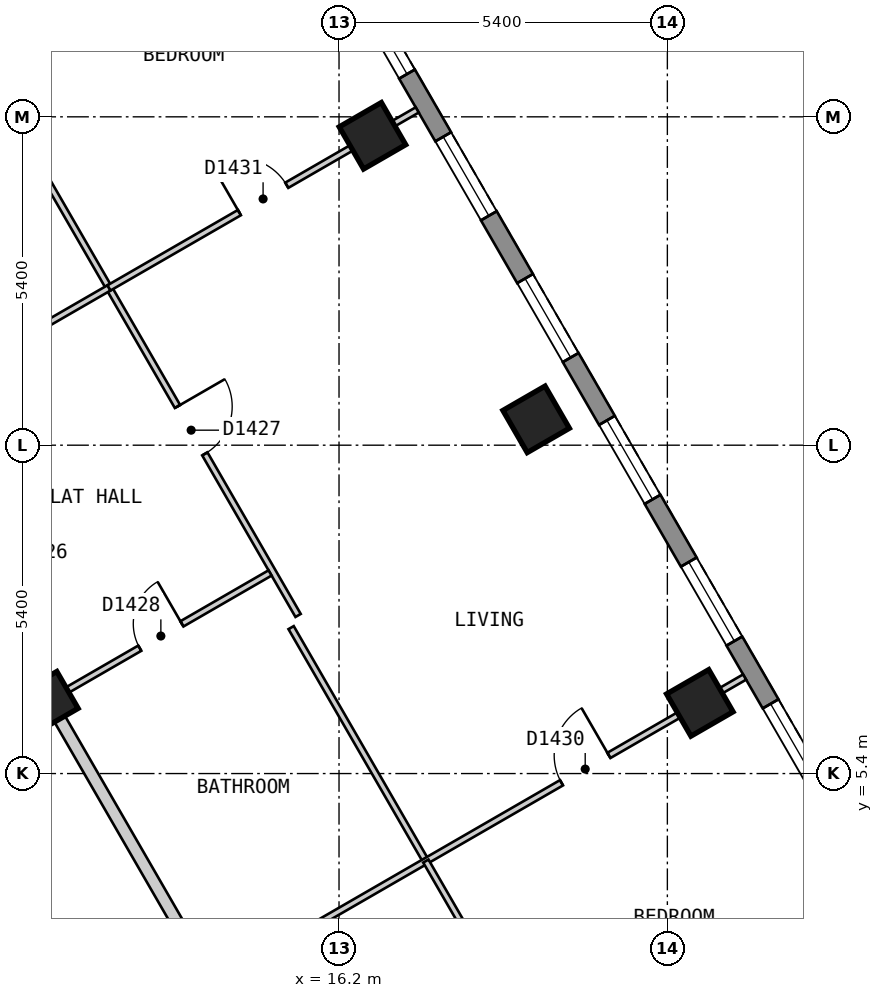
"""IFC4 building model, lengths in metres.
Left out: names, types, materials, properties, quantities, classifications, styles, units other than length and angle.
Written with IfcOpenShell. Run it as: python <this file> out.ifc"""

import sys

from ifc_helpers import new_model, si_unit, direction, frame, frame_2d, origin, origin_2d, place, context, subcontext, project, spatial, polyline, rectangle, outline, extrude, element, fill, save


model = new_model("IFC4")
c1 = context("Model", 3, precision=1e-05, world=origin(), true_north=direction((0.0, 1.0)))
c2 = subcontext(c1, "Body", "Model", "MODEL_VIEW")
j1 = project(units=[si_unit("LENGTHUNIT", "METRE"), si_unit("PLANEANGLEUNIT", "RADIAN")], contexts=[c1])
p1 = place(None, origin())
s1 = spatial("IfcSite", under=j1, at=p1, CompositionType="ELEMENT")
p2 = place(p1, origin())
s2 = spatial("IfcBuilding", under=s1, at=p2, CompositionType="ELEMENT")
p3 = place(p2, frame((0.0, 0.0, 178.2)))
s3 = spatial("IfcBuildingStorey", under=s2, at=p3, CompositionType="ELEMENT", Elevation=178.2)
for number, where, z_axis, x_axis in (
    (1, (22.134, 6.562, 0.0), (0.0, 0.0, 1.0), (-0.5, 0.866, 0.0)),
    (2, (19.442, 11.225, 0.0), (0.0, 0.0, 1.0), (-0.5, 0.866, 0.0)),
    (3, (16.75, 15.888, 0.0), (0.0, 0.0, 1.0), (-0.5, 0.866, 0.0)),
):
    element("IfcColumn", number, at=place(p3, frame(where, z_axis=z_axis, x_axis=x_axis)), inside=s3, PredefinedType="COLUMN", context=c2, shape_type="SweptSolid", body=[
        extrude(rectangle(XDim=0.8, YDim=0.8, at=origin_2d()), origin(), (0.0, 0.0, 1.0), 3.0),
    ])
p4 = place(p3, frame((11.431, 6.6, 0.0), z_axis=(0.0, 0.0, 1.0), x_axis=(-0.5, 0.866025403784, 0.0)))
e4 = element("IfcColumn", 4, at=p4, inside=s3, PredefinedType="COLUMN", context=c2, shape_type="SweptSolid", body=[
    extrude(rectangle(XDim=0.7, YDim=0.7, at=origin_2d()), origin(), (0.0, 0.0, 1.0), 3.0),
])
p5 = place(p3, frame((26.024, 1.825, 0.0), z_axis=(0.0, 0.0, 1.0), x_axis=(-0.500010537973, 0.866019319597, 0.0)))
e5 = element("IfcWall", 5, at=p5, inside=s3, PredefinedType="SOLIDWALL", context=c2, shape_type="SweptSolid", body=[
    extrude(outline(polyline([(0.0, -0.15), (22.863, -0.15), (22.783, 0.15), (0.08, 0.15), (0.0, -0.15)])), origin(), (0.0, 0.0, 1.0), 2.7),
])
p6 = place(p5, frame((1.259, 0.0, 0.15)))
e6 = element("IfcOpeningElement", 6, at=p6, cuts=e5, PredefinedType="OPENING", context=c2, shape_type="SweptSolid", body=[
    extrude(rectangle(XDim=1.5, YDim=2.1, at=frame_2d((0.75, 1.05))), frame((0.0, 0.16, 0.0), z_axis=(0.0, -1.0, 0.0), x_axis=(1.0, 0.0, 0.0)), (0.0, 0.0, 1.0), 0.32),
])
p7 = place(p5, frame((3.952, 0.0, 0.15)))
e7 = element("IfcOpeningElement", 7, at=p7, cuts=e5, PredefinedType="OPENING", context=c2, shape_type="SweptSolid", body=[
    extrude(rectangle(XDim=1.5, YDim=2.1, at=frame_2d((0.75, 1.05))), frame((0.0, 0.16, 0.0), z_axis=(0.0, -1.0, 0.0), x_axis=(1.0, 0.0, 0.0)), (0.0, 0.0, 1.0), 0.32),
])
p8 = place(p5, frame((6.644, 0.0, 0.15)))
e8 = element("IfcOpeningElement", 8, at=p8, cuts=e5, PredefinedType="OPENING", context=c2, shape_type="SweptSolid", body=[
    extrude(rectangle(XDim=1.5, YDim=2.1, at=frame_2d((0.75, 1.05))), frame((0.0, 0.16, 0.0), z_axis=(0.0, -1.0, 0.0), x_axis=(1.0, 0.0, 0.0)), (0.0, 0.0, 1.0), 0.32),
])
p9 = place(p5, frame((9.335, 0.0, 0.15)))
e9 = element("IfcOpeningElement", 9, at=p9, cuts=e5, PredefinedType="OPENING", context=c2, shape_type="SweptSolid", body=[
    extrude(rectangle(XDim=1.5, YDim=2.1, at=frame_2d((0.75, 1.05))), frame((0.0, 0.16, 0.0), z_axis=(0.0, -1.0, 0.0), x_axis=(1.0, 0.0, 0.0)), (0.0, 0.0, 1.0), 0.32),
])
p10 = place(p5, frame((12.028, 0.0, 0.15)))
e10 = element("IfcOpeningElement", 10, at=p10, cuts=e5, PredefinedType="OPENING", context=c2, shape_type="SweptSolid", body=[
    extrude(rectangle(XDim=1.5, YDim=2.1, at=frame_2d((0.75, 1.05))), frame((0.0, 0.16, 0.0), z_axis=(0.0, -1.0, 0.0), x_axis=(1.0, 0.0, 0.0)), (0.0, 0.0, 1.0), 0.32),
])
p11 = place(p5, frame((14.72, 0.0, 0.15)))
e11 = element("IfcOpeningElement", 11, at=p11, cuts=e5, PredefinedType="OPENING", context=c2, shape_type="SweptSolid", body=[
    extrude(rectangle(XDim=1.5, YDim=2.1, at=frame_2d((0.75, 1.05))), frame((0.0, 0.16, 0.0), z_axis=(0.0, -1.0, 0.0), x_axis=(1.0, 0.0, 0.0)), (0.0, 0.0, 1.0), 0.32),
])
p12 = place(p5, frame((17.411, 0.0, 0.15)))
e12 = element("IfcOpeningElement", 12, at=p12, cuts=e5, PredefinedType="OPENING", context=c2, shape_type="SweptSolid", body=[
    extrude(rectangle(XDim=1.5, YDim=2.1, at=frame_2d((0.75, 1.05))), frame((0.0, 0.16, 0.0), z_axis=(0.0, -1.0, 0.0), x_axis=(1.0, 0.0, 0.0)), (0.0, 0.0, 1.0), 0.32),
])
p13 = place(p5, frame((20.104, 0.0, 0.15)))
e13 = element("IfcOpeningElement", 13, at=p13, cuts=e5, PredefinedType="OPENING", context=c2, shape_type="SweptSolid", body=[
    extrude(rectangle(XDim=1.5, YDim=2.1, at=frame_2d((0.75, 1.05))), frame((0.0, 0.16, 0.0), z_axis=(0.0, -1.0, 0.0), x_axis=(1.0, 0.0, 0.0)), (0.0, 0.0, 1.0), 0.32),
])
p14 = place(p3, frame((9.469, 5.6, 0.0), z_axis=(0.0, 0.0, 1.0), x_axis=(0.499964524401, -0.866045884662, 0.0)))
e14 = element("IfcWall", 14, at=p14, inside=s3, PredefinedType="PARTITIONING", context=c2, shape_type="SweptSolid", body=[
    extrude(rectangle(XDim=7.042, YDim=0.2, at=frame_2d((3.521, 0.0))), origin(), (0.0, 0.0, 1.0), 2.7),
])
p15 = place(p14, frame((3.129, 0.0, 0.0)))
e15 = element("IfcOpeningElement", 15, at=p15, cuts=e14, PredefinedType="OPENING", context=c2, shape_type="SweptSolid", body=[
    extrude(rectangle(XDim=0.9, YDim=2.1, at=frame_2d((0.45, 1.05))), frame((0.0, 0.11, 0.0), z_axis=(0.0, -1.0, 0.0), x_axis=(1.0, 0.0, 0.0)), (0.0, 0.0, 1.0), 0.22),
])
p16 = place(p3, frame((10.739, 7.8, 0.0), z_axis=(0.0, 0.0, 1.0), x_axis=(0.499964311759, -0.86604600742, 0.0)))
e16 = element("IfcWall", 16, at=p16, inside=s3, PredefinedType="PARTITIONING", context=c2, shape_type="SweptSolid", body=[
    extrude(rectangle(XDim=9.583, YDim=0.2, at=frame_2d((4.792, 0.0))), origin(), (0.0, 0.0, 1.0), 2.7),
])
p17 = place(p3, frame((15.412, 7.8, 0.0), z_axis=(0.0, 0.0, 1.0), x_axis=(0.499882970317, -0.866092960361, 0.0)))
e17 = element("IfcWall", 17, at=p17, inside=s3, PredefinedType="PARTITIONING", context=c2, shape_type="SweptSolid", body=[
    extrude(rectangle(XDim=4.433, YDim=0.1, at=frame_2d((2.216, 0.0))), origin(), (0.0, 0.0, 1.0), 2.7),
])
p18 = place(p3, frame((9.827, 17.874, 0.0), z_axis=(0.0, 0.0, 1.0), x_axis=(0.499962189394, -0.866047232647, 0.0)))
e18 = element("IfcWall", 18, at=p18, inside=s3, PredefinedType="PARTITIONING", context=c2, shape_type="SweptSolid", body=[
    extrude(rectangle(XDim=11.401, YDim=0.1, at=frame_2d((5.701, 0.0))), origin(), (0.0, 0.0, 1.0), 2.7),
])
p19 = place(p18, frame((7.433, 0.0, 0.0)))
e19 = element("IfcOpeningElement", 19, at=p19, cuts=e18, PredefinedType="OPENING", context=c2, shape_type="SweptSolid", body=[
    extrude(rectangle(XDim=0.9, YDim=2.1, at=frame_2d((0.45, 1.05))), frame((0.0, 0.06, 0.0), z_axis=(0.0, -1.0, 0.0), x_axis=(1.0, 0.0, 0.0)), (0.0, 0.0, 1.0), 0.12),
])
p20 = place(p3, frame((14.21, 1.987, 0.0), z_axis=(0.0, 0.0, 1.0), x_axis=(0.866022959057, 0.500004234368, 0.0)))
e20 = element("IfcWall", 20, at=p20, inside=s3, PredefinedType="PARTITIONING", context=c2, shape_type="SweptSolid", body=[
    extrude(rectangle(XDim=10.0, YDim=0.1, at=frame_2d((5.0, 0.0))), origin(), (0.0, 0.0, 1.0), 2.7),
])
p21 = place(p20, frame((6.523, 0.0, 0.0)))
e21 = element("IfcOpeningElement", 21, at=p21, cuts=e20, PredefinedType="OPENING", context=c2, shape_type="SweptSolid", body=[
    extrude(rectangle(XDim=0.9, YDim=2.1, at=frame_2d((0.45, 1.05))), frame((0.0, 0.06, 0.0), z_axis=(0.0, -1.0, 0.0), x_axis=(1.0, 0.0, 0.0)), (0.0, 0.0, 1.0), 0.12),
])
p22 = place(p3, frame((11.518, 6.65, 0.0), z_axis=(0.0, 0.0, 1.0), x_axis=(0.865949381454, 0.500131651427, 0.0)))
e22 = element("IfcWall", 22, at=p22, inside=s3, PredefinedType="PARTITIONING", context=c2, shape_type="SweptSolid", body=[
    extrude(rectangle(XDim=4.097, YDim=0.1, at=frame_2d((2.049, 0.0))), origin(), (0.0, 0.0, 1.0), 2.7),
])
p23 = place(p22, frame((1.623, 0.0, 0.0)))
e23 = element("IfcOpeningElement", 23, at=p23, cuts=e22, PredefinedType="OPENING", context=c2, shape_type="SweptSolid", body=[
    extrude(rectangle(XDim=0.8, YDim=2.1, at=frame_2d((0.4, 1.05))), frame((0.0, 0.06, 0.0), z_axis=(0.0, -1.0, 0.0), x_axis=(1.0, 0.0, 0.0)), (0.0, 0.0, 1.0), 0.12),
])
p24 = place(p3, frame((8.999, 11.413, 0.0), z_axis=(0.0, 0.0, 1.0), x_axis=(0.865969252911, 0.500097243556, 0.0)))
e24 = element("IfcWall", 24, at=p24, inside=s3, PredefinedType="PARTITIONING", context=c2, shape_type="SweptSolid", body=[
    extrude(rectangle(XDim=3.947, YDim=0.1, at=frame_2d((1.974, 0.0))), origin(), (0.0, 0.0, 1.0), 2.7),
])
p25 = place(p24, frame((1.474, 0.0, 0.0)))
e25 = element("IfcOpeningElement", 25, at=p25, cuts=e24, PredefinedType="OPENING", context=c2, shape_type="SweptSolid", body=[
    extrude(rectangle(XDim=0.9, YDim=2.1, at=frame_2d((0.45, 1.05))), frame((0.0, 0.06, 0.0), z_axis=(0.0, -1.0, 0.0), x_axis=(1.0, 0.0, 0.0)), (0.0, 0.0, 1.0), 0.12),
])
p26 = place(p3, frame((17.628, 3.961, 0.0), z_axis=(0.0, 0.0, 1.0), x_axis=(0.50003162148, -0.866007146345, 0.0)))
e26 = element("IfcWall", 26, at=p26, inside=s3, PredefinedType="PARTITIONING", context=c2, shape_type="SweptSolid", body=[
    extrude(rectangle(XDim=3.076, YDim=0.1, at=frame_2d((1.538, 0.0))), origin(), (0.0, 0.0, 1.0), 2.7),
])
p27 = place(p26, frame((1.167, 0.0, 0.0)))
e27 = element("IfcOpeningElement", 27, at=p27, cuts=e26, PredefinedType="OPENING", context=c2, shape_type="SweptSolid", body=[
    extrude(rectangle(XDim=0.8, YDim=2.1, at=frame_2d((0.4, 1.05))), frame((0.0, 0.06, 0.0), z_axis=(0.0, -1.0, 0.0), x_axis=(1.0, 0.0, 0.0)), (0.0, 0.0, 1.0), 0.12),
])
p28 = place(p3, frame((12.417, 13.387, 0.0), z_axis=(0.0, 0.0, 1.0), x_axis=(0.866070981966, 0.499921047963, 0.0)))
e28 = element("IfcWall", 28, at=p28, inside=s3, PredefinedType="PARTITIONING", context=c2, shape_type="SweptSolid", body=[
    extrude(rectangle(XDim=5.853, YDim=0.1, at=frame_2d((2.927, 0.0))), origin(), (0.0, 0.0, 1.0), 2.7),
])
p29 = place(p28, frame((2.476, 0.0, 0.0)))
e29 = element("IfcOpeningElement", 29, at=p29, cuts=e28, PredefinedType="OPENING", context=c2, shape_type="SweptSolid", body=[
    extrude(rectangle(XDim=0.9, YDim=2.1, at=frame_2d((0.45, 1.05))), frame((0.0, 0.06, 0.0), z_axis=(0.0, -1.0, 0.0), x_axis=(1.0, 0.0, 0.0)), (0.0, 0.0, 1.0), 0.12),
])
p30 = place(p7, origin())
e30 = element("IfcWindow", 30, at=p30, inside=s3, PartitioningType="SINGLE_PANEL", PredefinedType="WINDOW", context=c2, shape_type="SweptSolid", body=[
    extrude(rectangle(XDim=1.5, YDim=2.1, at=frame_2d((0.75, 1.05))), frame((0.0, 0.03, 0.0), z_axis=(0.0, -1.0, 0.0), x_axis=(1.0, 0.0, 0.0)), (0.0, 0.0, 1.0), 0.06),
])
fill(e7, e30)
p31 = place(p8, origin())
e31 = element("IfcWindow", 31, at=p31, inside=s3, PartitioningType="SINGLE_PANEL", PredefinedType="WINDOW", context=c2, shape_type="SweptSolid", body=[
    extrude(rectangle(XDim=1.5, YDim=2.1, at=frame_2d((0.75, 1.05))), frame((0.0, 0.03, 0.0), z_axis=(0.0, -1.0, 0.0), x_axis=(1.0, 0.0, 0.0)), (0.0, 0.0, 1.0), 0.06),
])
fill(e8, e31)
p32 = place(p9, origin())
e32 = element("IfcWindow", 32, at=p32, inside=s3, PartitioningType="SINGLE_PANEL", PredefinedType="WINDOW", context=c2, shape_type="SweptSolid", body=[
    extrude(rectangle(XDim=1.5, YDim=2.1, at=frame_2d((0.75, 1.05))), frame((0.0, 0.03, 0.0), z_axis=(0.0, -1.0, 0.0), x_axis=(1.0, 0.0, 0.0)), (0.0, 0.0, 1.0), 0.06),
])
fill(e9, e32)
p33 = place(p10, origin())
e33 = element("IfcWindow", 33, at=p33, inside=s3, PartitioningType="SINGLE_PANEL", PredefinedType="WINDOW", context=c2, shape_type="SweptSolid", body=[
    extrude(rectangle(XDim=1.5, YDim=2.1, at=frame_2d((0.75, 1.05))), frame((0.0, 0.03, 0.0), z_axis=(0.0, -1.0, 0.0), x_axis=(1.0, 0.0, 0.0)), (0.0, 0.0, 1.0), 0.06),
])
fill(e10, e33)
p34 = place(p11, origin())
e34 = element("IfcWindow", 34, at=p34, inside=s3, PartitioningType="SINGLE_PANEL", PredefinedType="WINDOW", context=c2, shape_type="SweptSolid", body=[
    extrude(rectangle(XDim=1.5, YDim=2.1, at=frame_2d((0.75, 1.05))), frame((0.0, 0.03, 0.0), z_axis=(0.0, -1.0, 0.0), x_axis=(1.0, 0.0, 0.0)), (0.0, 0.0, 1.0), 0.06),
])
fill(e11, e34)
p35 = place(p12, origin())
e35 = element("IfcWindow", 35, at=p35, inside=s3, PartitioningType="SINGLE_PANEL", PredefinedType="WINDOW", context=c2, shape_type="SweptSolid", body=[
    extrude(rectangle(XDim=1.5, YDim=2.1, at=frame_2d((0.75, 1.05))), frame((0.0, 0.03, 0.0), z_axis=(0.0, -1.0, 0.0), x_axis=(1.0, 0.0, 0.0)), (0.0, 0.0, 1.0), 0.06),
])
fill(e12, e35)
p36 = place(p19, origin())
e36 = element("IfcDoor", 36, at=p36, inside=s3, OperationType="SINGLE_SWING_LEFT", PredefinedType="DOOR", context=c2, shape_type="SweptSolid", body=[
    extrude(rectangle(XDim=0.9, YDim=2.1, at=frame_2d((0.45, 1.05))), frame((0.0, 0.025, 0.0), z_axis=(0.0, -1.0, 0.0), x_axis=(1.0, 0.0, 0.0)), (0.0, 0.0, 1.0), 0.05),
])
fill(e19, e36)
p37 = place(p23, origin())
e37 = element("IfcDoor", 37, at=p37, inside=s3, OperationType="SINGLE_SWING_RIGHT", PredefinedType="DOOR", context=c2, shape_type="SweptSolid", body=[
    extrude(rectangle(XDim=0.8, YDim=2.1, at=frame_2d((0.4, 1.05))), frame((0.0, 0.025, 0.0), z_axis=(0.0, -1.0, 0.0), x_axis=(1.0, 0.0, 0.0)), (0.0, 0.0, 1.0), 0.05),
])
fill(e23, e37)
p38 = place(p21, origin())
e38 = element("IfcDoor", 38, at=p38, inside=s3, OperationType="SINGLE_SWING_RIGHT", PredefinedType="DOOR", context=c2, shape_type="SweptSolid", body=[
    extrude(rectangle(XDim=0.9, YDim=2.1, at=frame_2d((0.45, 1.05))), frame((0.0, 0.025, 0.0), z_axis=(0.0, -1.0, 0.0), x_axis=(1.0, 0.0, 0.0)), (0.0, 0.0, 1.0), 0.05),
])
fill(e21, e38)
p39 = place(p29, origin())
e39 = element("IfcDoor", 39, at=p39, inside=s3, OperationType="SINGLE_SWING_LEFT", PredefinedType="DOOR", context=c2, shape_type="SweptSolid", body=[
    extrude(rectangle(XDim=0.9, YDim=2.1, at=frame_2d((0.45, 1.05))), frame((0.0, 0.025, 0.0), z_axis=(0.0, -1.0, 0.0), x_axis=(1.0, 0.0, 0.0)), (0.0, 0.0, 1.0), 0.05),
])
fill(e29, e39)
save(model, sys.argv[1])
